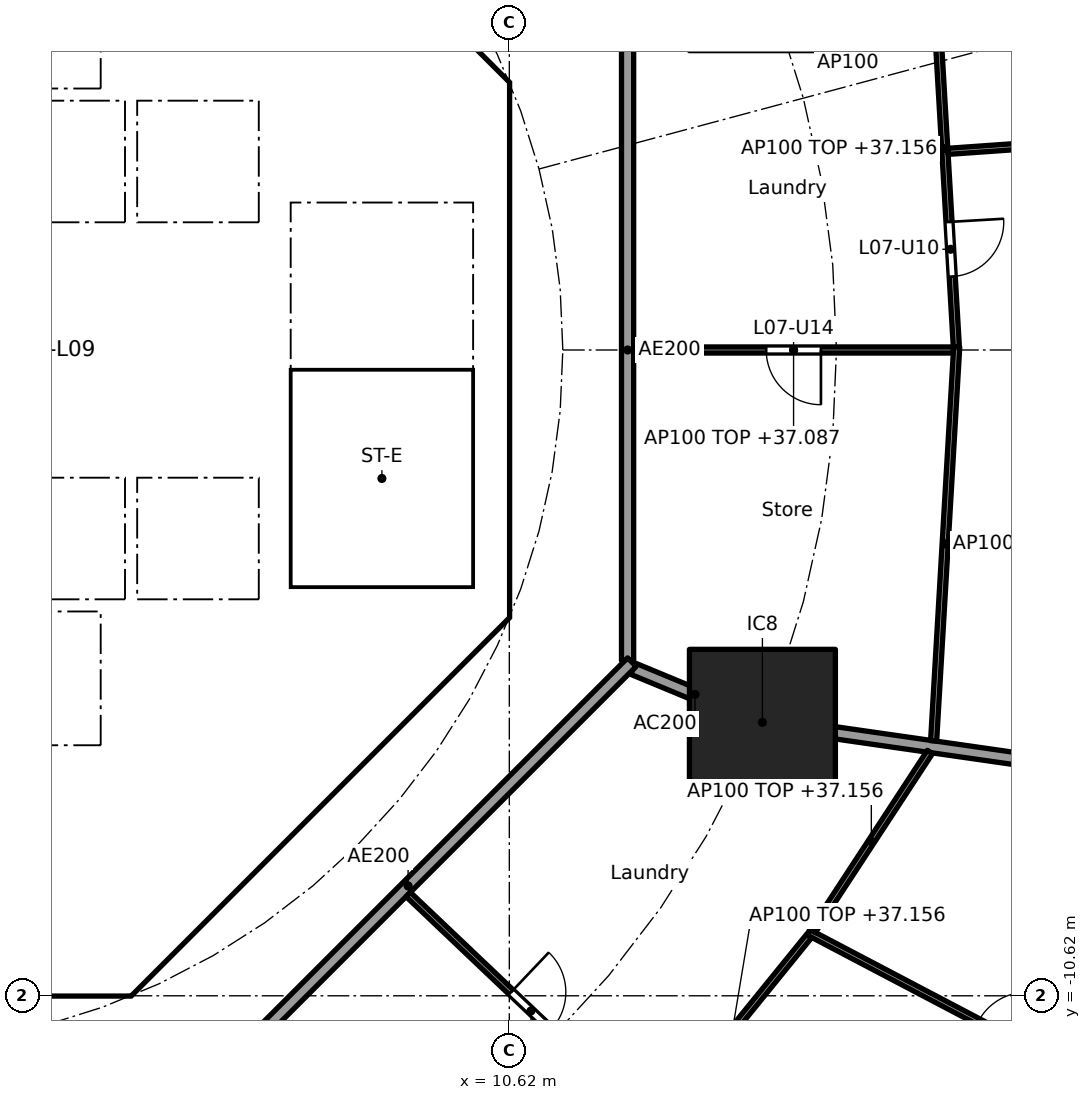
"""IFC4 building model, lengths in metres.
Left out: names, types, materials, properties, quantities, classifications, styles, units other than length and angle.
Written with IfcOpenShell. Run it as: python <this file> out.ifc"""

import sys

from ifc_helpers import new_model, si_unit, direction, frame, frame_2d, origin, origin_2d, place, context, subcontext, project, spatial, polyline, rectangle, outline, extrude, element, fill, save


model = new_model("IFC4")
c1 = context("Model", 3, precision=1e-05, world=origin(), true_north=direction((0.0, 1.0)))
c2 = subcontext(c1, "Body", "Model", "MODEL_VIEW")
j1 = project(units=[si_unit("LENGTHUNIT", "METRE"), si_unit("PLANEANGLEUNIT", "RADIAN")], contexts=[c1])
p1 = place(None, origin())
s1 = spatial("IfcSite", under=j1, at=p1, CompositionType="ELEMENT")
p2 = place(p1, origin())
s2 = spatial("IfcBuilding", under=s1, at=p2, CompositionType="ELEMENT")
p3 = place(p2, frame((0.0, 0.0, 34.4)))
s3 = spatial("IfcBuildingStorey", under=s2, at=p3, CompositionType="ELEMENT", Elevation=34.4)
p4 = place(p3, frame((14.782, -6.123, 0.0), z_axis=(0.0, 0.0, 1.0), x_axis=(1.0, 0.0, 0.0)))
e1 = element("IfcColumn", 1, at=p4, inside=s3, PredefinedType="COLUMN", context=c2, shape_type="SweptSolid", body=[
    extrude(rectangle(XDim=2.4, YDim=2.4, at=origin_2d()), origin(), (0.0, 0.0, 1.0), 3.7),
])
p5 = place(p3, frame((9.988, 4.613, 0.0), z_axis=(0.0, 0.0, 1.0), x_axis=(-0.707106781187, 0.707106781187, 0.0)))
e2 = element("IfcWall", 2, at=p5, inside=s3, PredefinedType="SHEAR", context=c2, shape_type="SweptSolid", body=[
    extrude(rectangle(XDim=7.602, YDim=0.6, at=frame_2d((3.801, 0.0))), origin(), (0.0, 0.0, 1.0), 3.44),
])
p6 = place(p5, frame((3.201, 0.0, 0.0)))
e3 = element("IfcOpeningElement", 3, at=p6, cuts=e2, PredefinedType="OPENING", context=c2, shape_type="SweptSolid", body=[
    extrude(rectangle(XDim=1.2, YDim=2.1, at=frame_2d((0.6, 1.05))), frame((0.0, 0.31, 0.0), z_axis=(0.0, -1.0, 0.0), x_axis=(1.0, 0.0, 0.0)), (0.0, 0.0, 1.0), 0.62),
])
p7 = place(p3, frame((4.613, -9.988, 0.0), z_axis=(0.0, 0.0, 1.0), x_axis=(0.707106781187, 0.707106781187, 0.0)))
e4 = element("IfcWall", 4, at=p7, inside=s3, PredefinedType="SHEAR", context=c2, shape_type="SweptSolid", body=[
    extrude(rectangle(XDim=7.602, YDim=0.6, at=frame_2d((3.801, 0.0))), origin(), (0.0, 0.0, 1.0), 3.44),
])
p8 = place(p7, frame((3.201, 0.0, 0.0)))
e5 = element("IfcOpeningElement", 5, at=p8, cuts=e4, PredefinedType="OPENING", context=c2, shape_type="SweptSolid", body=[
    extrude(rectangle(XDim=1.2, YDim=2.1, at=frame_2d((0.6, 1.05))), frame((0.0, 0.31, 0.0), z_axis=(0.0, -1.0, 0.0), x_axis=(1.0, 0.0, 0.0)), (0.0, 0.0, 1.0), 0.62),
])
p9 = place(p3, frame((4.0, 4.3, 0.0), z_axis=(0.0, 0.0, 1.0), x_axis=(0.0, 1.0, 0.0)))
e6 = element("IfcWall", 6, at=p9, inside=s3, PredefinedType="SOLIDWALL", context=c2, shape_type="SweptSolid", body=[
    extrude(rectangle(XDim=2.2, YDim=0.2, at=frame_2d((1.1, 0.0))), origin(), (0.0, 0.0, 1.0), 3.44),
])
p10 = place(p9, frame((0.55, 0.0, 0.0)))
e7 = element("IfcOpeningElement", 7, at=p10, cuts=e6, PredefinedType="OPENING", context=c2, shape_type="SweptSolid", body=[
    extrude(rectangle(XDim=1.1, YDim=2.1, at=frame_2d((0.55, 1.05))), frame((0.0, 0.11, 0.0), z_axis=(0.0, -1.0, 0.0), x_axis=(1.0, 0.0, 0.0)), (0.0, 0.0, 1.0), 0.22),
])
p11 = place(p3, frame((-6.7, 2.0, 0.0), z_axis=(0.0, 0.0, 1.0), x_axis=(1.0, 0.0, 0.0)))
e8 = element("IfcWall", 8, at=p11, inside=s3, PredefinedType="SOLIDWALL", context=c2, shape_type="SweptSolid", body=[
    extrude(rectangle(XDim=13.4, YDim=0.2, at=frame_2d((6.7, 0.0))), origin(), (0.0, 0.0, 1.0), 3.44),
])
p12 = place(p11, frame((0.65, 0.0, 0.0)))
e9 = element("IfcOpeningElement", 9, at=p12, cuts=e8, PredefinedType="OPENING", context=c2, shape_type="SweptSolid", body=[
    extrude(rectangle(XDim=1.1, YDim=2.1, at=frame_2d((0.55, 1.05))), frame((0.0, 0.11, 0.0), z_axis=(0.0, -1.0, 0.0), x_axis=(1.0, 0.0, 0.0)), (0.0, 0.0, 1.0), 0.22),
])
p13 = place(p11, frame((2.85, 0.0, 0.0)))
e10 = element("IfcOpeningElement", 10, at=p13, cuts=e8, PredefinedType="OPENING", context=c2, shape_type="SweptSolid", body=[
    extrude(rectangle(XDim=1.1, YDim=2.1, at=frame_2d((0.55, 1.05))), frame((0.0, 0.11, 0.0), z_axis=(0.0, -1.0, 0.0), x_axis=(1.0, 0.0, 0.0)), (0.0, 0.0, 1.0), 0.22),
])
p14 = place(p11, frame((5.05, 0.0, 0.0)))
e11 = element("IfcOpeningElement", 11, at=p14, cuts=e8, PredefinedType="OPENING", context=c2, shape_type="SweptSolid", body=[
    extrude(rectangle(XDim=1.1, YDim=2.1, at=frame_2d((0.55, 1.05))), frame((0.0, 0.11, 0.0), z_axis=(0.0, -1.0, 0.0), x_axis=(1.0, 0.0, 0.0)), (0.0, 0.0, 1.0), 0.22),
])
p15 = place(p3, frame((6.7, 4.0, 0.0), z_axis=(0.0, 0.0, 1.0), x_axis=(1.0, 0.0, 0.0)))
e12 = element("IfcWall", 12, at=p15, inside=s3, PredefinedType="SOLIDWALL", context=c2, shape_type="SweptSolid", body=[
    extrude(rectangle(XDim=3.325, YDim=0.2, at=frame_2d((1.662, 0.0))), origin(), (0.0, 0.0, 1.0), 3.44),
])
p16 = place(p15, frame((1.25, 0.0, 0.0)))
e13 = element("IfcOpeningElement", 13, at=p16, cuts=e12, PredefinedType="OPENING", context=c2, shape_type="SweptSolid", body=[
    extrude(rectangle(XDim=1.1, YDim=2.1, at=frame_2d((0.55, 1.05))), frame((0.0, 0.11, 0.0), z_axis=(0.0, -1.0, 0.0), x_axis=(1.0, 0.0, 0.0)), (0.0, 0.0, 1.0), 0.22),
])
p17 = place(p3, frame((4.0, -10.025, 0.0), z_axis=(0.0, 0.0, 1.0), x_axis=(0.0, 1.0, 0.0)))
e14 = element("IfcWall", 14, at=p17, inside=s3, PredefinedType="SOLIDWALL", context=c2, shape_type="SweptSolid", body=[
    extrude(rectangle(XDim=3.0, YDim=0.2, at=frame_2d((1.5, 0.0))), origin(), (0.0, 0.0, 1.0), 3.44),
])
p18 = place(p17, frame((0.975, 0.0, 0.0)))
e15 = element("IfcOpeningElement", 15, at=p18, cuts=e14, PredefinedType="OPENING", context=c2, shape_type="SweptSolid", body=[
    extrude(rectangle(XDim=1.1, YDim=2.1, at=frame_2d((0.55, 1.05))), frame((0.0, 0.11, 0.0), z_axis=(0.0, -1.0, 0.0), x_axis=(1.0, 0.0, 0.0)), (0.0, 0.0, 1.0), 0.22),
])
p19 = place(p3, frame((4.0, -6.5, 0.0), z_axis=(0.0, 0.0, 1.0), x_axis=(0.0, 1.0, 0.0)))
e16 = element("IfcWall", 16, at=p19, inside=s3, PredefinedType="SOLIDWALL", context=c2, shape_type="SweptSolid", body=[
    extrude(rectangle(XDim=2.2, YDim=0.2, at=frame_2d((1.1, 0.0))), origin(), (0.0, 0.0, 1.0), 3.44),
])
p20 = place(p19, frame((0.55, 0.0, 0.0)))
e17 = element("IfcOpeningElement", 17, at=p20, cuts=e16, PredefinedType="OPENING", context=c2, shape_type="SweptSolid", body=[
    extrude(rectangle(XDim=1.1, YDim=2.1, at=frame_2d((0.55, 1.05))), frame((0.0, 0.11, 0.0), z_axis=(0.0, -1.0, 0.0), x_axis=(1.0, 0.0, 0.0)), (0.0, 0.0, 1.0), 0.22),
])
p21 = place(p3, frame((-6.7, -2.0, 0.0), z_axis=(0.0, 0.0, 1.0), x_axis=(1.0, 0.0, 0.0)))
e18 = element("IfcWall", 18, at=p21, inside=s3, PredefinedType="SOLIDWALL", context=c2, shape_type="SweptSolid", body=[
    extrude(rectangle(XDim=13.4, YDim=0.2, at=frame_2d((6.7, 0.0))), origin(), (0.0, 0.0, 1.0), 3.44),
])
p22 = place(p21, frame((0.65, 0.0, 0.0)))
e19 = element("IfcOpeningElement", 19, at=p22, cuts=e18, PredefinedType="OPENING", context=c2, shape_type="SweptSolid", body=[
    extrude(rectangle(XDim=1.1, YDim=2.1, at=frame_2d((0.55, 1.05))), frame((0.0, 0.11, 0.0), z_axis=(0.0, -1.0, 0.0), x_axis=(1.0, 0.0, 0.0)), (0.0, 0.0, 1.0), 0.22),
])
p23 = place(p21, frame((2.85, 0.0, 0.0)))
e20 = element("IfcOpeningElement", 20, at=p23, cuts=e18, PredefinedType="OPENING", context=c2, shape_type="SweptSolid", body=[
    extrude(rectangle(XDim=1.1, YDim=2.1, at=frame_2d((0.55, 1.05))), frame((0.0, 0.11, 0.0), z_axis=(0.0, -1.0, 0.0), x_axis=(1.0, 0.0, 0.0)), (0.0, 0.0, 1.0), 0.22),
])
p24 = place(p3, origin())
e21 = element("IfcWall", 21, at=p24, inside=s3, PredefinedType="SHEAR", context=c2, shape_type="SweptSolid", body=[
    extrude(outline(polyline([(-4.152, -10.025), (4.152, -10.025), (4.401, -9.776), (4.825, -10.2), (4.401, -10.625), (-4.401, -10.625), (-4.825, -10.2), (-4.401, -9.776), (-4.152, -10.025)])), origin(), (0.0, 0.0, 1.0), 3.44),
])
p25 = place(p3, origin())
e22 = element("IfcWall", 22, at=p25, inside=s3, PredefinedType="SHEAR", context=c2, shape_type="SweptSolid", body=[
    extrude(outline(polyline([(9.776, -4.401), (10.025, -4.152), (10.025, -3.801), (10.025, 4.152), (9.776, 4.401), (10.2, 4.825), (10.625, 4.401), (10.625, -4.401), (10.2, -4.825), (9.776, -4.401)])), origin(), (0.0, 0.0, 1.0), 3.44),
])
p26 = place(p3, origin())
e23 = element("IfcWall", 23, at=p26, inside=s3, PredefinedType="SOLIDWALL", context=c2, shape_type="SweptSolid", body=[
    extrude(outline(polyline([(-6.7, -2.1), (-6.5, -2.1), (-6.5, -4.1), (-4.5, -4.1), (-4.5, -2.1), (-4.3, -2.1), (-4.3, -4.1), (-2.3, -4.1), (-2.3, -2.1), (-2.1, -2.1), (-2.1, -4.1), (-0.1, -4.1), (-0.1, -2.1), (0.1, -2.1), (0.1, -4.1), (2.1, -4.1), (2.1, -2.1), (2.3, -2.1), (2.3, -4.1), (4.3, -4.1), (4.3, -2.1), (4.5, -2.1), (4.5, -4.1), (6.5, -4.1), (6.5, -2.1), (6.7, -2.1), (6.7, -4.3), (-6.7, -4.3), (-6.7, -2.1)])), origin(), (0.0, 0.0, 1.0), 3.44),
])
p27 = place(p3, origin())
e24 = element("IfcWall", 24, at=p27, inside=s3, PredefinedType="SOLIDWALL", context=c2, shape_type="SweptSolid", body=[
    extrude(outline(polyline([(-6.5, 2.1), (-6.7, 2.1), (-6.7, 4.3), (6.7, 4.3), (6.7, 2.1), (6.5, 2.1), (6.5, 4.1), (4.5, 4.1), (4.5, 2.1), (4.3, 2.1), (4.3, 4.1), (2.3, 4.1), (2.3, 2.1), (2.1, 2.1), (2.1, 4.1), (0.1, 4.1), (0.1, 2.1), (-0.1, 2.1), (-0.1, 4.1), (-2.1, 4.1), (-2.1, 2.1), (-2.3, 2.1), (-2.3, 4.1), (-4.3, 4.1), (-4.3, 2.1), (-4.5, 2.1), (-4.5, 4.1), (-6.5, 4.1), (-6.5, 2.1)])), origin(), (0.0, 0.0, 1.0), 3.44),
])
p28 = place(p3, origin())
e25 = element("IfcWall", 25, at=p28, inside=s3, PredefinedType="SOLIDWALL", context=c2, shape_type="SweptSolid", body=[
    extrude(outline(polyline([(4.1, -7.025), (-4.1, -7.025), (-4.1, -6.5), (4.1, -6.5), (4.1, -7.025)])), origin(), (0.0, 0.0, 1.0), 3.44),
])
p29 = place(p3, origin())
e26 = element("IfcWall", 26, at=p29, inside=s3, PredefinedType="SOLIDWALL", context=c2, shape_type="SweptSolid", body=[
    extrude(outline(polyline([(7.025, -3.9), (6.7, -3.9), (6.7, 3.9), (7.025, 3.9), (7.025, -3.9)])), origin(), (0.0, 0.0, 1.0), 3.44),
])
p30 = place(p3, origin())
e27 = element("IfcWall", 27, at=p30, inside=s3, PredefinedType="SOLIDWALL", context=c2, shape_type="SweptSolid", body=[
    extrude(outline(polyline([(10.025, -4.1), (6.7, -4.1), (6.7, -3.9), (10.025, -3.9), (10.025, -4.1)])), origin(), (0.0, 0.0, 1.0), 3.44),
])
p31 = place(p3, frame((12.657, -5.243, 0.0), z_axis=(0.0, 0.0, 1.0), x_axis=(0.923853160736, -0.382747093259, 0.0)))
e28 = element("IfcWall", 28, at=p31, inside=s3, PredefinedType="PARTITIONING", context=c2, shape_type="SweptSolid", body=[
    extrude(rectangle(XDim=2.2, YDim=0.2, at=frame_2d((1.1, 0.0))), origin(), (0.0, 0.0, 1.0), 3.44),
])
p32 = place(p3, frame((14.832, -6.13, 0.0), z_axis=(0.0, 0.0, 1.0), x_axis=(0.989836541293, -0.142209779978, 0.0)))
e29 = element("IfcWall", 29, at=p32, inside=s3, PredefinedType="PARTITIONING", context=c2, shape_type="SweptSolid", body=[
    extrude(rectangle(XDim=15.909, YDim=0.2, at=frame_2d((7.955, 0.0))), origin(), (0.0, 0.0, 1.0), 2.756),
])
p33 = place(p3, frame((12.565, -5.104, 0.0), z_axis=(0.0, 0.0, 1.0), x_axis=(0.0, 1.0, 0.0)))
e30 = element("IfcWall", 30, at=p33, inside=s3, PredefinedType="PARTITIONING", context=c2, shape_type="SweptSolid", body=[
    extrude(rectangle(XDim=10.209, YDim=0.2, at=frame_2d((5.104, 0.0))), origin(), (0.0, 0.0, 1.0), 3.44),
])
p34 = place(p3, frame((5.275, -12.494, 0.0), z_axis=(0.0, 0.0, 1.0), x_axis=(0.707106781187, 0.707106781187, 0.0)))
e31 = element("IfcWall", 31, at=p34, inside=s3, PredefinedType="PARTITIONING", context=c2, shape_type="SweptSolid", body=[
    extrude(rectangle(XDim=10.409, YDim=0.2, at=frame_2d((5.205, 0.0))), origin(), (0.0, 0.0, 1.0), 3.44),
])
p35 = place(p3, frame((12.665, 0.0, 0.0), z_axis=(0.0, 0.0, 1.0), x_axis=(1.0, 0.0, 0.0)))
e32 = element("IfcWall", 32, at=p35, inside=s3, PredefinedType="PARTITIONING", context=c2, shape_type="SweptSolid", body=[
    extrude(rectangle(XDim=5.26, YDim=0.1, at=frame_2d((2.63, 0.0))), origin(), (0.0, 0.0, 1.0), 2.687),
])
p36 = place(p35, frame((2.18, 0.0, 0.0)))
e33 = element("IfcOpeningElement", 33, at=p36, cuts=e32, PredefinedType="OPENING", context=c2, shape_type="SweptSolid", body=[
    extrude(rectangle(XDim=0.9, YDim=2.1, at=frame_2d((0.45, 1.05))), frame((0.0, 0.06, 0.0), z_axis=(0.0, -1.0, 0.0), x_axis=(1.0, 0.0, 0.0)), (0.0, 0.0, 1.0), 0.12),
])
p37 = place(p3, frame((17.971, 0.05, 0.0), z_axis=(0.0, 0.0, 1.0), x_axis=(-0.058476853647, 0.998288764631, 0.0)))
e34 = element("IfcWall", 34, at=p37, inside=s3, PredefinedType="PARTITIONING", context=c2, shape_type="SweptSolid", body=[
    extrude(rectangle(XDim=6.538, YDim=0.1, at=frame_2d((3.269, 0.0))), origin(), (0.0, 0.0, 1.0), 2.756),
])
p38 = place(p37, frame((1.159, 0.0, 0.0)))
e35 = element("IfcOpeningElement", 35, at=p38, cuts=e34, PredefinedType="OPENING", context=c2, shape_type="SweptSolid", body=[
    extrude(rectangle(XDim=0.9, YDim=2.1, at=frame_2d((0.45, 1.05))), frame((0.0, 0.06, 0.0), z_axis=(0.0, -1.0, 0.0), x_axis=(1.0, 0.0, 0.0)), (0.0, 0.0, 1.0), 0.12),
])
p39 = place(p3, frame((17.977, 0.05, 0.0), z_axis=(0.0, 0.0, 1.0), x_axis=(-0.058516864568, -0.998286420103, 0.0)))
e36 = element("IfcWall", 36, at=p39, inside=s3, PredefinedType="PARTITIONING", context=c2, shape_type="SweptSolid", body=[
    extrude(rectangle(XDim=6.488, YDim=0.1, at=frame_2d((3.244, 0.0))), origin(), (0.0, 0.0, 1.0), 2.756),
])
p40 = place(p3, frame((17.833, 3.267, 0.0), z_axis=(0.0, 0.0, 1.0), x_axis=(0.997537184513, 0.070139614438, 0.0)))
e37 = element("IfcWall", 37, at=p40, inside=s3, PredefinedType="PARTITIONING", context=c2, shape_type="SweptSolid", body=[
    extrude(rectangle(XDim=6.784, YDim=0.1, at=frame_2d((3.392, 0.0))), origin(), (0.0, 0.0, 1.0), 3.44),
])
p41 = place(p40, frame((2.942, 0.0, 0.0)))
e38 = element("IfcOpeningElement", 38, at=p41, cuts=e37, PredefinedType="OPENING", context=c2, shape_type="SweptSolid", body=[
    extrude(rectangle(XDim=0.9, YDim=2.1, at=frame_2d((0.45, 1.05))), frame((0.0, 0.06, 0.0), z_axis=(0.0, -1.0, 0.0), x_axis=(1.0, 0.0, 0.0)), (0.0, 0.0, 1.0), 0.12),
])
p42 = place(p3, frame((8.957, -8.953, 0.0), z_axis=(0.0, 0.0, 1.0), x_axis=(0.725250022034, -0.688485588476, 0.0)))
e39 = element("IfcWall", 39, at=p42, inside=s3, PredefinedType="PARTITIONING", context=c2, shape_type="SweptSolid", body=[
    extrude(rectangle(XDim=12.963, YDim=0.1, at=frame_2d((6.481, 0.0))), origin(), (0.0, 0.0, 1.0), 2.687),
])
p43 = place(p42, frame((2.333, 0.0, 0.0)))
e40 = element("IfcOpeningElement", 40, at=p43, cuts=e39, PredefinedType="OPENING", context=c2, shape_type="SweptSolid", body=[
    extrude(rectangle(XDim=0.9, YDim=2.1, at=frame_2d((0.45, 1.05))), frame((0.0, 0.06, 0.0), z_axis=(0.0, -1.0, 0.0), x_axis=(1.0, 0.0, 0.0)), (0.0, 0.0, 1.0), 0.12),
])
p44 = place(p42, frame((8.79, 0.0, 0.0)))
e41 = element("IfcOpeningElement", 41, at=p44, cuts=e39, PredefinedType="OPENING", context=c2, shape_type="SweptSolid", body=[
    extrude(rectangle(XDim=0.9, YDim=2.1, at=frame_2d((0.45, 1.05))), frame((0.0, 0.06, 0.0), z_axis=(0.0, -1.0, 0.0), x_axis=(1.0, 0.0, 0.0)), (0.0, 0.0, 1.0), 0.12),
])
p45 = place(p3, frame((13.026, -12.747, 0.0), z_axis=(0.0, 0.0, 1.0), x_axis=(0.630126826288, 0.776492229705, 0.0)))
e42 = element("IfcWall", 42, at=p45, inside=s3, PredefinedType="PARTITIONING", context=c2, shape_type="SweptSolid", body=[
    extrude(rectangle(XDim=4.007, YDim=0.1, at=frame_2d((2.003, 0.0))), origin(), (0.0, 0.0, 1.0), 2.756),
])
p46 = place(p3, frame((15.538, -9.574, 0.0), z_axis=(0.0, 0.0, 1.0), x_axis=(0.885181406501, -0.465246039838, 0.0)))
e43 = element("IfcWall", 43, at=p46, inside=s3, PredefinedType="PARTITIONING", context=c2, shape_type="SweptSolid", body=[
    extrude(rectangle(XDim=13.837, YDim=0.1, at=frame_2d((6.918, 0.0))), origin(), (0.0, 0.0, 1.0), 2.756),
])
p47 = place(p46, frame((3.156, 0.0, 0.0)))
e44 = element("IfcOpeningElement", 44, at=p47, cuts=e43, PredefinedType="OPENING", context=c2, shape_type="SweptSolid", body=[
    extrude(rectangle(XDim=0.9, YDim=2.1, at=frame_2d((0.45, 1.05))), frame((0.0, 0.06, 0.0), z_axis=(0.0, -1.0, 0.0), x_axis=(1.0, 0.0, 0.0)), (0.0, 0.0, 1.0), 0.12),
])
p48 = place(p46, frame((10.05, 0.0, 0.0)))
e45 = element("IfcOpeningElement", 45, at=p48, cuts=e43, PredefinedType="OPENING", context=c2, shape_type="SweptSolid", body=[
    extrude(rectangle(XDim=0.9, YDim=2.1, at=frame_2d((0.45, 1.05))), frame((0.0, 0.06, 0.0), z_axis=(0.0, -1.0, 0.0), x_axis=(1.0, 0.0, 0.0)), (0.0, 0.0, 1.0), 0.12),
])
p49 = place(p3, frame((15.609, -9.556, 0.0), z_axis=(0.0, 0.0, 1.0), x_axis=(0.547637987196, 0.836715384692, 0.0)))
e46 = element("IfcWall", 46, at=p49, inside=s3, PredefinedType="PARTITIONING", context=c2, shape_type="SweptSolid", body=[
    extrude(rectangle(XDim=3.52, YDim=0.1, at=frame_2d((1.76, 0.0))), origin(), (0.0, 0.0, 1.0), 2.756),
])
p50 = place(p10, origin())
e47 = element("IfcDoor", 47, at=p50, inside=s3, OperationType="DOUBLE_DOOR_SLIDING", PredefinedType="DOOR", context=c2, shape_type="SweptSolid", body=[
    extrude(rectangle(XDim=1.1, YDim=2.1, at=frame_2d((0.55, 1.05))), frame((0.0, 0.025, 0.0), z_axis=(0.0, -1.0, 0.0), x_axis=(1.0, 0.0, 0.0)), (0.0, 0.0, 1.0), 0.05),
])
fill(e7, e47)
p51 = place(p20, origin())
e48 = element("IfcDoor", 48, at=p51, inside=s3, OperationType="DOUBLE_DOOR_SLIDING", PredefinedType="DOOR", context=c2, shape_type="SweptSolid", body=[
    extrude(rectangle(XDim=1.1, YDim=2.1, at=frame_2d((0.55, 1.05))), frame((0.0, 0.025, 0.0), z_axis=(0.0, -1.0, 0.0), x_axis=(1.0, 0.0, 0.0)), (0.0, 0.0, 1.0), 0.05),
])
fill(e17, e48)
p52 = place(p16, frame((1.1, 0.0, 0.0), x_axis=(-1.0, 0.0, 0.0)))
e49 = element("IfcDoor", 49, at=p52, inside=s3, OperationType="SINGLE_SWING_RIGHT", PredefinedType="DOOR", context=c2, shape_type="SweptSolid", body=[
    extrude(rectangle(XDim=1.1, YDim=2.1, at=frame_2d((0.55, 1.05))), frame((0.0, 0.025, 0.0), z_axis=(0.0, -1.0, 0.0), x_axis=(1.0, 0.0, 0.0)), (0.0, 0.0, 1.0), 0.05),
])
fill(e13, e49)
p53 = place(p18, origin())
e50 = element("IfcDoor", 50, at=p53, inside=s3, OperationType="SINGLE_SWING_RIGHT", PredefinedType="DOOR", context=c2, shape_type="SweptSolid", body=[
    extrude(rectangle(XDim=1.1, YDim=2.1, at=frame_2d((0.55, 1.05))), frame((0.0, 0.025, 0.0), z_axis=(0.0, -1.0, 0.0), x_axis=(1.0, 0.0, 0.0)), (0.0, 0.0, 1.0), 0.05),
])
fill(e15, e50)
p54 = place(p8, origin())
e51 = element("IfcDoor", 51, at=p54, inside=s3, OperationType="SINGLE_SWING_RIGHT", PredefinedType="DOOR", context=c2, shape_type="SweptSolid", body=[
    extrude(rectangle(XDim=1.2, YDim=2.1, at=frame_2d((0.6, 1.05))), frame((0.0, 0.025, 0.0), z_axis=(0.0, -1.0, 0.0), x_axis=(1.0, 0.0, 0.0)), (0.0, 0.0, 1.0), 0.05),
])
fill(e5, e51)
p55 = place(p38, frame((0.9, 0.0, 0.0), x_axis=(-1.0, 0.0, 0.0)))
e52 = element("IfcDoor", 52, at=p55, inside=s3, OperationType="SINGLE_SWING_LEFT", PredefinedType="DOOR", context=c2, shape_type="SweptSolid", body=[
    extrude(rectangle(XDim=0.9, YDim=2.1, at=frame_2d((0.45, 1.05))), frame((0.0, 0.025, 0.0), z_axis=(0.0, -1.0, 0.0), x_axis=(1.0, 0.0, 0.0)), (0.0, 0.0, 1.0), 0.05),
])
fill(e35, e52)
p56 = place(p36, frame((0.9, 0.0, 0.0), x_axis=(-1.0, 0.0, 0.0)))
e53 = element("IfcDoor", 53, at=p56, inside=s3, OperationType="SINGLE_SWING_LEFT", PredefinedType="DOOR", context=c2, shape_type="SweptSolid", body=[
    extrude(rectangle(XDim=0.9, YDim=2.1, at=frame_2d((0.45, 1.05))), frame((0.0, 0.025, 0.0), z_axis=(0.0, -1.0, 0.0), x_axis=(1.0, 0.0, 0.0)), (0.0, 0.0, 1.0), 0.05),
])
fill(e33, e53)
p57 = place(p43, origin())
e54 = element("IfcDoor", 54, at=p57, inside=s3, OperationType="SINGLE_SWING_LEFT", PredefinedType="DOOR", context=c2, shape_type="SweptSolid", body=[
    extrude(rectangle(XDim=0.9, YDim=2.1, at=frame_2d((0.45, 1.05))), frame((0.0, 0.025, 0.0), z_axis=(0.0, -1.0, 0.0), x_axis=(1.0, 0.0, 0.0)), (0.0, 0.0, 1.0), 0.05),
])
fill(e40, e54)
p58 = place(p47, origin())
e55 = element("IfcDoor", 55, at=p58, inside=s3, OperationType="SINGLE_SWING_RIGHT", PredefinedType="DOOR", context=c2, shape_type="SweptSolid", body=[
    extrude(rectangle(XDim=0.9, YDim=2.1, at=frame_2d((0.45, 1.05))), frame((0.0, 0.025, 0.0), z_axis=(0.0, -1.0, 0.0), x_axis=(1.0, 0.0, 0.0)), (0.0, 0.0, 1.0), 0.05),
])
fill(e44, e55)
save(model, sys.argv[1])
